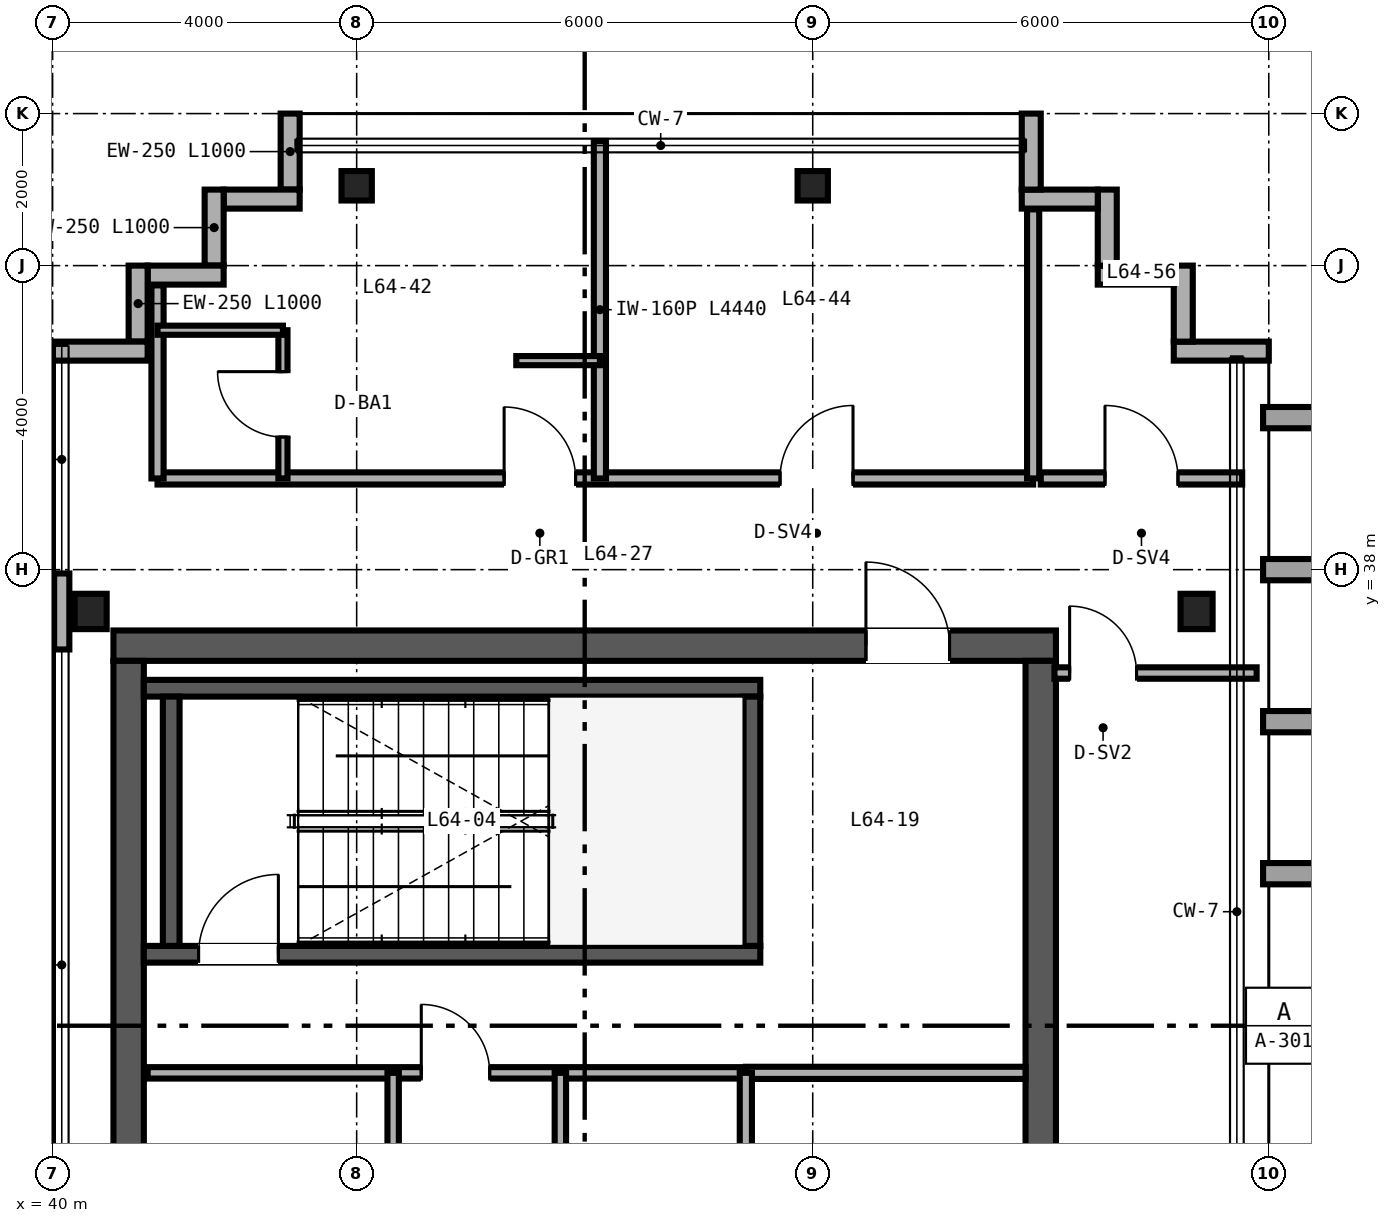
"""IFC4 building model, lengths in metres.
Left out: names, types, materials, properties, quantities, classifications, styles, units other than length and angle.
Written with IfcOpenShell. Run it as: python <this file> out.ifc"""

import sys

from ifc_helpers import new_model, si_unit, direction, frame, frame_2d, origin, origin_2d, place, context, subcontext, project, spatial, rectangle, i_section, extrude, source, transform, mapped, element, fill, save


model = new_model("IFC4")
c1 = context("Model", 3, precision=1e-05, world=origin(), true_north=direction((0.0, 1.0)))
c2 = subcontext(c1, "Body", "Model", "MODEL_VIEW")
j1 = project(units=[si_unit("LENGTHUNIT", "METRE"), si_unit("PLANEANGLEUNIT", "RADIAN")], contexts=[c1])
p1 = place(None, origin())
s1 = spatial("IfcSite", under=j1, at=p1, CompositionType="ELEMENT")
p2 = place(p1, origin())
s2 = spatial("IfcBuilding", under=s1, at=p2, CompositionType="ELEMENT")
p3 = place(p2, frame((0.0, 0.0, 254.4)))
s3 = spatial("IfcBuildingStorey", under=s2, at=p3, CompositionType="ELEMENT", Elevation=254.4)
p4 = place(p3, frame((40.8, 37.0, 0.0), z_axis=(0.0, 0.0, 1.0), x_axis=(1.0, 0.0, 0.0)))
e1 = element("IfcWall", 1, at=p4, inside=s3, PredefinedType="SHEAR", context=c2, shape_type="SweptSolid", body=[
    extrude(rectangle(XDim=12.4, YDim=0.4, at=frame_2d((6.2, 0.0))), origin(), (0.0, 0.0, 1.0), 3.38),
])
p5 = place(p4, frame((9.9, 0.0, 0.0)))
e2 = element("IfcOpeningElement", 2, at=p5, cuts=e1, PredefinedType="OPENING", context=c2, shape_type="SweptSolid", body=[
    extrude(rectangle(XDim=1.1, YDim=2.15, at=frame_2d((0.55, 1.075))), frame((0.0, 0.21, 0.0), z_axis=(0.0, -1.0, 0.0), x_axis=(1.0, 0.0, 0.0)), (0.0, 0.0, 1.0), 0.42),
])
for number, where, z_axis, x_axis in (
    (3, (41.0, 15.2, 0.0), (0.0, 0.0, 1.0), (0.0, 1.0, 0.0)),
    (4, (53.0, 15.2, 0.0), (0.0, 0.0, 1.0), (0.0, 1.0, 0.0)),
):
    element("IfcWall", number, at=place(p3, frame(where, z_axis=z_axis, x_axis=x_axis)), inside=s3, PredefinedType="SHEAR", context=c2, shape_type="SweptSolid", body=[
        extrude(rectangle(XDim=21.6, YDim=0.4, at=frame_2d((10.8, 0.0))), origin(), (0.0, 0.0, 1.0), 3.38),
    ])
p6 = place(p3, frame((41.2, 32.94, 0.0), z_axis=(0.0, 0.0, 1.0), x_axis=(1.0, 0.0, 0.0)))
e5 = element("IfcWall", 5, at=p6, inside=s3, PredefinedType="SHEAR", context=c2, shape_type="SweptSolid", body=[
    extrude(rectangle(XDim=8.11, YDim=0.22, at=frame_2d((4.055, 0.0))), origin(), (0.0, 0.0, 1.0), 3.4),
])
p7 = place(p6, frame((0.72, 0.0, 0.0)))
e6 = element("IfcOpeningElement", 6, at=p7, cuts=e5, PredefinedType="OPENING", context=c2, shape_type="SweptSolid", body=[
    extrude(rectangle(XDim=1.05, YDim=2.15, at=frame_2d((0.525, 1.075))), frame((0.0, 0.12, 0.0), z_axis=(0.0, -1.0, 0.0), x_axis=(1.0, 0.0, 0.0)), (0.0, 0.0, 1.0), 0.24),
])
p8 = place(p3, frame((41.2, 36.44, 0.0), z_axis=(0.0, 0.0, 1.0), x_axis=(1.0, 0.0, 0.0)))
e7 = element("IfcWall", 7, at=p8, inside=s3, PredefinedType="SHEAR", context=c2, shape_type="SweptSolid", body=[
    extrude(rectangle(XDim=8.11, YDim=0.22, at=frame_2d((4.055, 0.0))), origin(), (0.0, 0.0, 1.0), 3.4),
])
for number, where, z_axis, x_axis in (
    (8, (41.56, 33.05, 0.0), (0.0, 0.0, 1.0), (0.0, 1.0, 0.0)),
    (9, (49.2, 33.05, 0.0), (0.0, 0.0, 1.0), (0.0, 1.0, 0.0)),
):
    element("IfcWall", number, at=place(p3, frame(where, z_axis=z_axis, x_axis=x_axis)), inside=s3, PredefinedType="SHEAR", context=c2, shape_type="SweptSolid", body=[
        extrude(rectangle(XDim=3.28, YDim=0.22, at=frame_2d((1.64, 0.0))), origin(), (0.0, 0.0, 1.0), 3.4),
    ])
m1 = source(origin(), c2, "Body", "SweptSolid", [
    extrude(i_section(OverallWidth=0.422, OverallDepth=0.465, WebThickness=0.045, FlangeThickness=0.073, FilletRadius=0.025, at=origin_2d()), origin(), (0.0, 0.0, 1.0), 3.38),
])
for number, where, z_axis, x_axis in (
    (10, (40.5, 37.45, 0.0), (0.0, 0.0, 1.0), (1.0, 0.0, 0.0)),
    (11, (55.05, 37.45, 0.0), (0.0, 0.0, 1.0), (1.0, 0.0, 0.0)),
):
    element("IfcColumn", number, at=place(p3, frame(where, z_axis=z_axis, x_axis=x_axis)), inside=s3, PredefinedType="COLUMN", context=c2, shape_type="MappedRepresentation", body=[
        mapped(m1, transform((0.0, 0.0, 0.0), scale=1.0)),
    ])
m2 = source(origin(), c2, "Body", "SweptSolid", [
    extrude(i_section(OverallWidth=0.399, OverallDepth=0.387, WebThickness=0.021, FlangeThickness=0.033, FilletRadius=0.025, at=origin_2d()), origin(), (0.0, 0.0, 1.0), 3.38),
])
for number, where, z_axis, x_axis in (
    (12, (44.0, 43.05, 0.0), (0.0, 0.0, 1.0), (1.0, 0.0, 0.0)),
    (13, (50.0, 43.05, 0.0), (0.0, 0.0, 1.0), (1.0, 0.0, 0.0)),
):
    element("IfcColumn", number, at=place(p3, frame(where, z_axis=z_axis, x_axis=x_axis)), inside=s3, PredefinedType="COLUMN", context=c2, shape_type="MappedRepresentation", body=[
        mapped(m2, transform((0.0, 0.0, 0.0), scale=1.0)),
    ])
p9 = place(p3, frame((56.0, 40.875, 0.0), z_axis=(0.0, 0.0, 1.0), x_axis=(-1.0, 0.0, 0.0)))
e14 = element("IfcWall", 14, at=p9, inside=s3, PredefinedType="SOLIDWALL", context=c2, shape_type="SweptSolid", body=[
    extrude(rectangle(XDim=1.25, YDim=0.25, at=frame_2d((0.625, 0.0))), origin(), (0.0, 0.0, 1.0), 3.38),
])
for number, where, z_axis, x_axis in (
    (15, (54.875, 41.0, 0.0), (0.0, 0.0, 1.0), (0.0, 1.0, 0.0)),
    (16, (54.75, 41.875, 0.0), (0.0, 0.0, 1.0), (-1.0, 0.0, 0.0)),
    (17, (53.875, 42.0, 0.0), (0.0, 0.0, 1.0), (0.0, 1.0, 0.0)),
    (18, (53.75, 42.875, 0.0), (0.0, 0.0, 1.0), (-1.0, 0.0, 0.0)),
    (19, (52.875, 43.0, 0.0), (0.0, 0.0, 1.0), (0.0, 1.0, 0.0)),
    (20, (43.125, 44.0, 0.0), (0.0, 0.0, 1.0), (0.0, -1.0, 0.0)),
    (21, (43.25, 42.875, 0.0), (0.0, 0.0, 1.0), (-1.0, 0.0, 0.0)),
    (22, (42.125, 43.0, 0.0), (0.0, 0.0, 1.0), (0.0, -1.0, 0.0)),
    (23, (42.25, 41.875, 0.0), (0.0, 0.0, 1.0), (-1.0, 0.0, 0.0)),
    (24, (41.125, 42.0, 0.0), (0.0, 0.0, 1.0), (0.0, -1.0, 0.0)),
):
    element("IfcWall", number, at=place(p3, frame(where, z_axis=z_axis, x_axis=x_axis)), inside=s3, PredefinedType="SOLIDWALL", context=c2, shape_type="SweptSolid", body=[
        extrude(rectangle(XDim=1.0, YDim=0.25, at=frame_2d((0.5, 0.0))), origin(), (0.0, 0.0, 1.0), 3.38),
    ])
p10 = place(p3, frame((41.25, 40.875, 0.0), z_axis=(0.0, 0.0, 1.0), x_axis=(-1.0, 0.0, 0.0)))
e25 = element("IfcWall", 25, at=p10, inside=s3, PredefinedType="SOLIDWALL", context=c2, shape_type="SweptSolid", body=[
    extrude(rectangle(XDim=1.25, YDim=0.25, at=frame_2d((0.625, 0.0))), origin(), (0.0, 0.0, 1.0), 3.38),
])
p11 = place(p3, frame((40.12, 36.95, 0.0), z_axis=(0.0, 0.0, 1.0), x_axis=(0.0, 1.0, 0.0)))
e26 = element("IfcWall", 26, at=p11, inside=s3, PredefinedType="PARAPET", context=c2, shape_type="SweptSolid", body=[
    extrude(rectangle(XDim=1.0, YDim=0.2, at=frame_2d((0.5, 0.0))), origin(), (0.0, 0.0, 1.0), 3.38),
])
p12 = place(p3, frame((41.25, 31.38, 0.0), z_axis=(0.0, 0.0, 1.0), x_axis=(1.0, 0.0, 0.0)))
e27 = element("IfcWall", 27, at=p12, inside=s3, PredefinedType="PARTITIONING", context=c2, shape_type="SweptSolid", body=[
    extrude(rectangle(XDim=7.87, YDim=0.15, at=frame_2d((3.935, 0.0))), origin(), (0.0, 0.0, 1.0), 2.48),
])
p13 = place(p12, frame((3.6, 0.0, 0.0)))
e28 = element("IfcOpeningElement", 28, at=p13, cuts=e27, PredefinedType="OPENING", context=c2, shape_type="SweptSolid", body=[
    extrude(rectangle(XDim=0.9, YDim=2.15, at=frame_2d((0.45, 1.075))), frame((0.0, 0.085, 0.0), z_axis=(0.0, -1.0, 0.0), x_axis=(1.0, 0.0, 0.0)), (0.0, 0.0, 1.0), 0.17),
])
p14 = place(p3, frame((46.68, 15.25, 0.0), z_axis=(0.0, 0.0, 1.0), x_axis=(0.0, 1.0, 0.0)))
e29 = element("IfcWall", 29, at=p14, inside=s3, PredefinedType="PARTITIONING", context=c2, shape_type="SweptSolid", body=[
    extrude(rectangle(XDim=16.13, YDim=0.15, at=frame_2d((8.065, 0.0))), origin(), (0.0, 0.0, 1.0), 2.453),
])
p15 = place(p14, frame((7.5, 0.0, 0.0)))
e30 = element("IfcOpeningElement", 30, at=p15, cuts=e29, PredefinedType="OPENING", context=c2, shape_type="SweptSolid", body=[
    extrude(rectangle(XDim=0.9, YDim=2.15, at=frame_2d((0.45, 1.075))), frame((0.0, 0.085, 0.0), z_axis=(0.0, -1.0, 0.0), x_axis=(1.0, 0.0, 0.0)), (0.0, 0.0, 1.0), 0.17),
])
p16 = place(p3, frame((49.12, 31.38, 0.0), z_axis=(0.0, 0.0, 1.0), x_axis=(1.0, 0.0, 0.0)))
e31 = element("IfcWall", 31, at=p16, inside=s3, PredefinedType="PARTITIONING", context=c2, shape_type="SweptSolid", body=[
    extrude(rectangle(XDim=3.68, YDim=0.16, at=frame_2d((1.84, 0.0))), origin(), (0.0, 0.0, 1.0), 2.48),
])
p17 = place(p3, frame((49.12, 15.25, 0.0), z_axis=(0.0, 0.0, 1.0), x_axis=(0.0, 1.0, 0.0)))
e32 = element("IfcWall", 32, at=p17, inside=s3, PredefinedType="PARTITIONING", context=c2, shape_type="SweptSolid", body=[
    extrude(rectangle(XDim=16.13, YDim=0.16, at=frame_2d((8.065, 0.0))), origin(), (0.0, 0.0, 1.0), 2.453),
])
p18 = place(p17, frame((4.0, 0.0, 0.0)))
e33 = element("IfcOpeningElement", 33, at=p18, cuts=e32, PredefinedType="OPENING", context=c2, shape_type="SweptSolid", body=[
    extrude(rectangle(XDim=0.92, YDim=2.15, at=frame_2d((0.46, 1.075))), frame((0.0, 0.09, 0.0), z_axis=(0.0, -1.0, 0.0), x_axis=(1.0, 0.0, 0.0)), (0.0, 0.0, 1.0), 0.18),
])
p19 = place(p17, frame((12.0, 0.0, 0.0)))
e34 = element("IfcOpeningElement", 34, at=p19, cuts=e32, PredefinedType="OPENING", context=c2, shape_type="SweptSolid", body=[
    extrude(rectangle(XDim=0.92, YDim=2.15, at=frame_2d((0.46, 1.075))), frame((0.0, 0.09, 0.0), z_axis=(0.0, -1.0, 0.0), x_axis=(1.0, 0.0, 0.0)), (0.0, 0.0, 1.0), 0.18),
])
p20 = place(p3, frame((44.48, 15.25, 0.0), z_axis=(0.0, 0.0, 1.0), x_axis=(0.0, 1.0, 0.0)))
e35 = element("IfcWall", 35, at=p20, inside=s3, PredefinedType="PARTITIONING", context=c2, shape_type="SweptSolid", body=[
    extrude(rectangle(XDim=16.13, YDim=0.15, at=frame_2d((8.065, 0.0))), origin(), (0.0, 0.0, 1.0), 2.453),
])
p21 = place(p20, frame((4.5, 0.0, 0.0)))
e36 = element("IfcOpeningElement", 36, at=p21, cuts=e35, PredefinedType="OPENING", context=c2, shape_type="SweptSolid", body=[
    extrude(rectangle(XDim=0.92, YDim=2.15, at=frame_2d((0.46, 1.075))), frame((0.0, 0.085, 0.0), z_axis=(0.0, -1.0, 0.0), x_axis=(1.0, 0.0, 0.0)), (0.0, 0.0, 1.0), 0.17),
])
p22 = place(p3, frame((41.38, 39.2, 0.0), z_axis=(0.0, 0.0, 1.0), x_axis=(1.0, 0.0, 0.0)))
e37 = element("IfcWall", 37, at=p22, inside=s3, PredefinedType="PARTITIONING", context=c2, shape_type="SweptSolid", body=[
    extrude(rectangle(XDim=11.52, YDim=0.16, at=frame_2d((5.76, 0.0))), origin(), (0.0, 0.0, 1.0), 3.38),
])
p23 = place(p22, frame((4.56, 0.0, 0.0)))
e38 = element("IfcOpeningElement", 38, at=p23, cuts=e37, PredefinedType="OPENING", context=c2, shape_type="SweptSolid", body=[
    extrude(rectangle(XDim=0.94, YDim=2.15, at=frame_2d((0.47, 1.075))), frame((0.0, 0.09, 0.0), z_axis=(0.0, -1.0, 0.0), x_axis=(1.0, 0.0, 0.0)), (0.0, 0.0, 1.0), 0.18),
])
p24 = place(p22, frame((8.19, 0.0, 0.0)))
e39 = element("IfcOpeningElement", 39, at=p24, cuts=e37, PredefinedType="OPENING", context=c2, shape_type="SweptSolid", body=[
    extrude(rectangle(XDim=0.96, YDim=2.15, at=frame_2d((0.48, 1.075))), frame((0.0, 0.09, 0.0), z_axis=(0.0, -1.0, 0.0), x_axis=(1.0, 0.0, 0.0)), (0.0, 0.0, 1.0), 0.18),
])
p25 = place(p3, frame((41.38, 39.2, 0.0), z_axis=(0.0, 0.0, 1.0), x_axis=(0.0, 1.0, 0.0)))
e40 = element("IfcWall", 40, at=p25, inside=s3, PredefinedType="PARTITIONING", context=c2, shape_type="SweptSolid", body=[
    extrude(rectangle(XDim=2.54, YDim=0.16, at=frame_2d((1.27, 0.0))), origin(), (0.0, 0.0, 1.0), 3.38),
])
p26 = place(p3, frame((52.9, 39.2, 0.0), z_axis=(0.0, 0.0, 1.0), x_axis=(0.0, 1.0, 0.0)))
e41 = element("IfcWall", 41, at=p26, inside=s3, PredefinedType="PARTITIONING", context=c2, shape_type="SweptSolid", body=[
    extrude(rectangle(XDim=3.54, YDim=0.16, at=frame_2d((1.77, 0.0))), origin(), (0.0, 0.0, 1.0), 3.38),
])
p27 = place(p3, frame((47.2, 39.2, 0.0), z_axis=(0.0, 0.0, 1.0), x_axis=(0.0, 1.0, 0.0)))
e42 = element("IfcWall", 42, at=p27, inside=s3, PredefinedType="PARTITIONING", context=c2, shape_type="SweptSolid", body=[
    extrude(rectangle(XDim=4.44, YDim=0.16, at=frame_2d((2.22, 0.0))), origin(), (0.0, 0.0, 1.0), 2.687),
])
p28 = place(p3, frame((43.03, 39.2, 0.0), z_axis=(0.0, 0.0, 1.0), x_axis=(0.0, 1.0, 0.0)))
e43 = element("IfcWall", 43, at=p28, inside=s3, PredefinedType="PARTITIONING", context=c2, shape_type="SweptSolid", body=[
    extrude(rectangle(XDim=1.95, YDim=0.12, at=frame_2d((0.975, 0.0))), origin(), (0.0, 0.0, 1.0), 3.38),
])
p29 = place(p28, frame((0.545, 0.0, 0.0)))
e44 = element("IfcOpeningElement", 44, at=p29, cuts=e43, PredefinedType="OPENING", context=c2, shape_type="SweptSolid", body=[
    extrude(rectangle(XDim=0.86, YDim=2.1, at=frame_2d((0.43, 1.05))), frame((0.0, 0.07, 0.0), z_axis=(0.0, -1.0, 0.0), x_axis=(1.0, 0.0, 0.0)), (0.0, 0.0, 1.0), 0.14),
])
p30 = place(p3, frame((41.38, 41.15, 0.0), z_axis=(0.0, 0.0, 1.0), x_axis=(1.0, 0.0, 0.0)))
e45 = element("IfcWall", 45, at=p30, inside=s3, PredefinedType="PARTITIONING", context=c2, shape_type="SweptSolid", body=[
    extrude(rectangle(XDim=1.65, YDim=0.12, at=frame_2d((0.825, 0.0))), origin(), (0.0, 0.0, 1.0), 3.38),
])
p31 = place(p3, frame((46.1, 40.75, 0.0), z_axis=(0.0, 0.0, 1.0), x_axis=(1.0, 0.0, 0.0)))
e46 = element("IfcWall", 46, at=p31, inside=s3, PredefinedType="PARTITIONING", context=c2, shape_type="SweptSolid", body=[
    extrude(rectangle(XDim=1.1, YDim=0.12, at=frame_2d((0.55, 0.0))), origin(), (0.0, 0.0, 1.0), 3.38),
])
p32 = place(p3, frame((53.18, 36.64, 0.0), z_axis=(0.0, 0.0, 1.0), x_axis=(1.0, 0.0, 0.0)))
e47 = element("IfcWall", 47, at=p32, inside=s3, PredefinedType="PARTITIONING", context=c2, shape_type="SweptSolid", body=[
    extrude(rectangle(XDim=2.66, YDim=0.15, at=frame_2d((1.33, 0.0))), origin(), (0.0, 0.0, 1.0), 2.763),
])
p33 = place(p32, frame((0.2, 0.0, 0.0)))
e48 = element("IfcOpeningElement", 48, at=p33, cuts=e47, PredefinedType="OPENING", context=c2, shape_type="SweptSolid", body=[
    extrude(rectangle(XDim=0.88, YDim=2.15, at=frame_2d((0.44, 1.075))), frame((0.0, 0.085, 0.0), z_axis=(0.0, -1.0, 0.0), x_axis=(1.0, 0.0, 0.0)), (0.0, 0.0, 1.0), 0.17),
])
p34 = place(p3, frame((53.0, 39.2, 0.0), z_axis=(0.0, 0.0, 1.0), x_axis=(1.0, 0.0, 0.0)))
e49 = element("IfcWall", 49, at=p34, inside=s3, PredefinedType="PARTITIONING", context=c2, shape_type="SweptSolid", body=[
    extrude(rectangle(XDim=2.65, YDim=0.16, at=frame_2d((1.325, 0.0))), origin(), (0.0, 0.0, 1.0), 3.38),
])
p35 = place(p34, frame((0.845, 0.0, 0.0)))
e50 = element("IfcOpeningElement", 50, at=p35, cuts=e49, PredefinedType="OPENING", context=c2, shape_type="SweptSolid", body=[
    extrude(rectangle(XDim=0.96, YDim=2.15, at=frame_2d((0.48, 1.075))), frame((0.0, 0.09, 0.0), z_axis=(0.0, -1.0, 0.0), x_axis=(1.0, 0.0, 0.0)), (0.0, 0.0, 1.0), 0.18),
])
m3 = source(origin(), c2, "Body", "SweptSolid", [
    extrude(rectangle(XDim=1.05, YDim=2.15, at=frame_2d((0.525, 1.075))), frame((0.0, 0.025, 0.0), z_axis=(0.0, -1.0, 0.0), x_axis=(1.0, 0.0, 0.0)), (0.0, 0.0, 1.0), 0.05),
])
p36 = place(p7, origin())
e51 = element("IfcDoor", 51, at=p36, inside=s3, OperationType="SINGLE_SWING_RIGHT", PredefinedType="DOOR", context=c2, shape_type="MappedRepresentation", body=[
    mapped(m3, transform((0.0, 0.0, 0.0), scale=1.0)),
])
fill(e6, e51)
m4 = source(origin(), c2, "Body", "SweptSolid", [
    extrude(rectangle(XDim=0.9, YDim=2.15, at=frame_2d((0.45, 1.075))), frame((0.0, 0.025, 0.0), z_axis=(0.0, -1.0, 0.0), x_axis=(1.0, 0.0, 0.0)), (0.0, 0.0, 1.0), 0.05),
])
p37 = place(p13, origin())
e52 = element("IfcDoor", 52, at=p37, inside=s3, OperationType="SINGLE_SWING_LEFT", PredefinedType="DOOR", context=c2, shape_type="MappedRepresentation", body=[
    mapped(m4, transform((0.0, 0.0, 0.0), scale=1.0)),
])
fill(e28, e52)
m5 = source(origin(), c2, "Body", "SweptSolid", [
    extrude(rectangle(XDim=1.1, YDim=2.15, at=frame_2d((0.55, 1.075))), frame((0.0, 0.025, 0.0), z_axis=(0.0, -1.0, 0.0), x_axis=(1.0, 0.0, 0.0)), (0.0, 0.0, 1.0), 0.05),
])
p38 = place(p5, origin())
e53 = element("IfcDoor", 53, at=p38, inside=s3, OperationType="SINGLE_SWING_LEFT", PredefinedType="DOOR", context=c2, shape_type="MappedRepresentation", body=[
    mapped(m5, transform((0.0, 0.0, 0.0), scale=1.0)),
])
fill(e2, e53)
m6 = source(origin(), c2, "Body", "SweptSolid", [
    extrude(rectangle(XDim=0.86, YDim=2.1, at=frame_2d((0.43, 1.05))), frame((0.0, 0.025, 0.0), z_axis=(0.0, -1.0, 0.0), x_axis=(1.0, 0.0, 0.0)), (0.0, 0.0, 1.0), 0.05),
])
p39 = place(p29, origin())
e54 = element("IfcDoor", 54, at=p39, inside=s3, OperationType="SINGLE_SWING_RIGHT", PredefinedType="DOOR", context=c2, shape_type="MappedRepresentation", body=[
    mapped(m6, transform((0.0, 0.0, 0.0), scale=1.0)),
])
fill(e44, e54)
m7 = source(origin(), c2, "Body", "SweptSolid", [
    extrude(rectangle(XDim=0.94, YDim=2.15, at=frame_2d((0.47, 1.075))), frame((0.0, 0.025, 0.0), z_axis=(0.0, -1.0, 0.0), x_axis=(1.0, 0.0, 0.0)), (0.0, 0.0, 1.0), 0.05),
])
p40 = place(p23, origin())
e55 = element("IfcDoor", 55, at=p40, inside=s3, OperationType="SINGLE_SWING_LEFT", PredefinedType="DOOR", context=c2, shape_type="MappedRepresentation", body=[
    mapped(m7, transform((0.0, 0.0, 0.0), scale=1.0)),
])
fill(e38, e55)
m8 = source(origin(), c2, "Body", "SweptSolid", [
    extrude(rectangle(XDim=0.96, YDim=2.15, at=frame_2d((0.48, 1.075))), frame((0.0, 0.025, 0.0), z_axis=(0.0, -1.0, 0.0), x_axis=(1.0, 0.0, 0.0)), (0.0, 0.0, 1.0), 0.05),
])
p41 = place(p24, origin())
e56 = element("IfcDoor", 56, at=p41, inside=s3, OperationType="SINGLE_SWING_RIGHT", PredefinedType="DOOR", context=c2, shape_type="MappedRepresentation", body=[
    mapped(m8, transform((0.0, 0.0, 0.0), scale=1.0)),
])
fill(e39, e56)
m9 = source(origin(), c2, "Body", "SweptSolid", [
    extrude(rectangle(XDim=0.88, YDim=2.15, at=frame_2d((0.44, 1.075))), frame((0.0, 0.025, 0.0), z_axis=(0.0, -1.0, 0.0), x_axis=(1.0, 0.0, 0.0)), (0.0, 0.0, 1.0), 0.05),
])
p42 = place(p33, origin())
e57 = element("IfcDoor", 57, at=p42, inside=s3, OperationType="SINGLE_SWING_LEFT", PredefinedType="DOOR", context=c2, shape_type="MappedRepresentation", body=[
    mapped(m9, transform((0.0, 0.0, 0.0), scale=1.0)),
])
fill(e48, e57)
p43 = place(p35, origin())
e58 = element("IfcDoor", 58, at=p43, inside=s3, OperationType="SINGLE_SWING_LEFT", PredefinedType="DOOR", context=c2, shape_type="MappedRepresentation", body=[
    mapped(m8, transform((0.0, 0.0, 0.0), scale=1.0)),
])
fill(e50, e58)
save(model, sys.argv[1])
